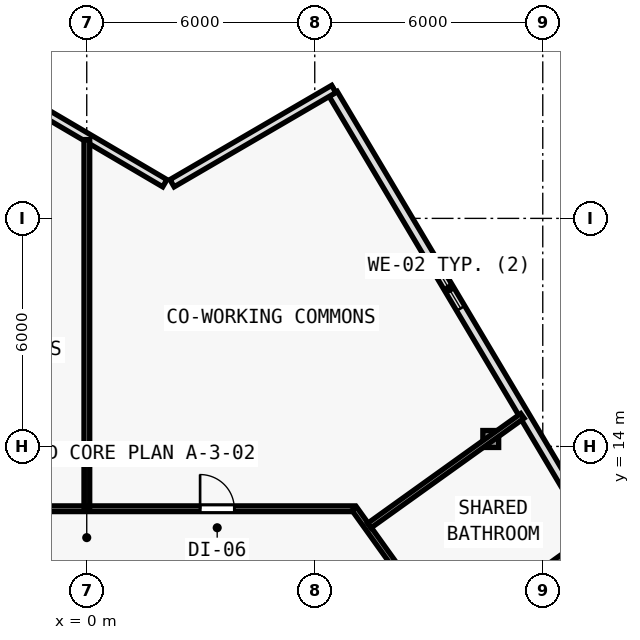
"""IFC4 building model, lengths in metres.
Left out: names, types, materials, properties, quantities, classifications, styles, units other than length and angle.
Written with IfcOpenShell. Run it as: python <this file> out.ifc"""

import sys

from ifc_helpers import new_model, si_unit, direction, frame, frame_2d, origin, origin_2d, place, context, subcontext, project, spatial, rectangle, i_section, extrude, element, fill, save


model = new_model("IFC4")
c1 = context("Model", 3, precision=1e-05, world=origin(), true_north=direction((0.0, 1.0)))
c2 = subcontext(c1, "Body", "Model", "MODEL_VIEW")
j1 = project(units=[si_unit("LENGTHUNIT", "METRE"), si_unit("PLANEANGLEUNIT", "RADIAN")], contexts=[c1])
p1 = place(None, origin())
s1 = spatial("IfcSite", under=j1, at=p1, CompositionType="ELEMENT")
p2 = place(p1, origin())
s2 = spatial("IfcBuilding", under=s1, at=p2, CompositionType="ELEMENT")
p3 = place(p2, frame((0.0, 0.0, 48.0)))
s3 = spatial("IfcBuildingStorey", under=s2, at=p3, CompositionType="ELEMENT", Elevation=48.0)
p4 = place(p3, frame((10.632, 14.195, 0.006), z_axis=(-0.011767855299, -0.002516824544, 0.999927588966), x_axis=(0.209143047003, -0.977885057607, 0.0)))
e1 = element("IfcColumn", 1, at=p4, inside=s3, PredefinedType="COLUMN", context=c2, shape_type="SweptSolid", body=[
    extrude(i_section(OverallWidth=0.416, OverallDepth=0.446, WebThickness=0.025, FlangeThickness=0.04, FilletRadius=0.015, at=origin_2d()), origin(), (0.0, 0.0, 1.0), 3.589),
])
p5 = place(p3, frame((6.483, 23.278, 0.0), z_axis=(0.0, 0.0, 1.0), x_axis=(0.511086421046, -0.859529330635, 0.0)))
e2 = element("IfcWall", 2, at=p5, inside=s3, PredefinedType="SOLIDWALL", context=c2, shape_type="SweptSolid", body=[
    extrude(rectangle(XDim=11.935, YDim=0.25, at=frame_2d((5.968, 0.0))), origin(), (0.0, 0.0, 1.0), 3.35),
])
p6 = place(p5, frame((5.368, 0.0, 0.62)))
e3 = element("IfcOpeningElement", 3, at=p6, cuts=e2, PredefinedType="OPENING", context=c2, shape_type="SweptSolid", body=[
    extrude(rectangle(XDim=1.2, YDim=1.8, at=frame_2d((0.6, 0.9))), frame((0.0, 0.135, 0.0), z_axis=(0.0, -1.0, 0.0), x_axis=(1.0, 0.0, 0.0)), (0.0, 0.0, 1.0), 0.27),
])
p7 = place(p3, frame((2.245, 20.925, 0.0), z_axis=(0.0, 0.0, 1.0), x_axis=(0.863967641515, 0.503547330858, 0.0)))
e4 = element("IfcWall", 4, at=p7, inside=s3, PredefinedType="SOLIDWALL", context=c2, shape_type="SweptSolid", body=[
    extrude(rectangle(XDim=4.925, YDim=0.22, at=frame_2d((2.462, 0.0))), origin(), (0.0, 0.0, 1.0), 3.35),
])
p8 = place(p3, frame((-2.635, 23.681, 0.0), z_axis=(0.0, 0.0, 1.0), x_axis=(0.862126841454, -0.506692519428, 0.0)))
e5 = element("IfcWall", 5, at=p8, inside=s3, PredefinedType="SOLIDWALL", context=c2, shape_type="SweptSolid", body=[
    extrude(rectangle(XDim=5.439, YDim=0.22, at=frame_2d((2.72, 0.0))), origin(), (0.0, 0.0, 1.0), 3.35),
])
p9 = place(p3, frame((-7.041, 12.36, 0.0), z_axis=(0.0, 0.0, 1.0), x_axis=(1.0, 0.0, 0.0)))
e6 = element("IfcWall", 6, at=p9, inside=s3, PredefinedType="PARTITIONING", context=c2, shape_type="SweptSolid", body=[
    extrude(rectangle(XDim=14.082, YDim=0.15, at=frame_2d((7.041, 0.0))), origin(), (0.0, 0.0, 1.0), 3.35),
])
p10 = place(p9, frame((10.024, 0.0, 0.0)))
e7 = element("IfcOpeningElement", 7, at=p10, cuts=e6, PredefinedType="OPENING", context=c2, shape_type="SweptSolid", body=[
    extrude(rectangle(XDim=0.9, YDim=2.1, at=frame_2d((0.45, 1.05))), frame((0.0, 0.085, 0.0), z_axis=(0.0, -1.0, 0.0), x_axis=(1.0, 0.0, 0.0)), (0.0, 0.0, 1.0), 0.17),
])
p11 = place(p9, frame((3.161, 0.0, 0.0)))
e8 = element("IfcOpeningElement", 8, at=p11, cuts=e6, PredefinedType="OPENING", context=c2, shape_type="SweptSolid", body=[
    extrude(rectangle(XDim=0.9, YDim=2.1, at=frame_2d((0.45, 1.05))), frame((0.0, 0.085, 0.0), z_axis=(0.0, -1.0, 0.0), x_axis=(1.0, 0.0, 0.0)), (0.0, 0.0, 1.0), 0.17),
])
p12 = place(p3, frame((7.041, 12.36, 0.0), z_axis=(0.0, 0.0, 1.0), x_axis=(0.582449511476, -0.812866881218, 0.0)))
e9 = element("IfcWall", 9, at=p12, inside=s3, PredefinedType="PARTITIONING", context=c2, shape_type="SweptSolid", body=[
    extrude(rectangle(XDim=4.84, YDim=0.15, at=frame_2d((2.42, 0.0))), origin(), (0.0, 0.0, 1.0), 2.725),
])
p13 = place(p12, frame((2.86, 0.0, 0.0)))
e10 = element("IfcOpeningElement", 10, at=p13, cuts=e9, PredefinedType="OPENING", context=c2, shape_type="SweptSolid", body=[
    extrude(rectangle(XDim=0.85, YDim=2.1, at=frame_2d((0.425, 1.05))), frame((0.0, 0.085, 0.0), z_axis=(0.0, -1.0, 0.0), x_axis=(1.0, 0.0, 0.0)), (0.0, 0.0, 1.0), 0.17),
])
p14 = place(p3, frame((7.434, 11.915, 0.0), z_axis=(0.0, 0.0, 1.0), x_axis=(0.812890943838, 0.582415928205, 0.0)))
e11 = element("IfcWall", 11, at=p14, inside=s3, PredefinedType="PARTITIONING", context=c2, shape_type="SweptSolid", body=[
    extrude(rectangle(XDim=4.958, YDim=0.15, at=frame_2d((2.479, 0.0))), origin(), (0.0, 0.0, 1.0), 2.725),
])
p15 = place(p3, frame((9.553, 8.957, 0.0), z_axis=(0.0, 0.0, 1.0), x_axis=(0.812884279405, 0.58242522979, 0.0)))
e12 = element("IfcWall", 12, at=p15, inside=s3, PredefinedType="PARTITIONING", context=c2, shape_type="SweptSolid", body=[
    extrude(rectangle(XDim=4.647, YDim=0.15, at=frame_2d((2.324, 0.0))), origin(), (0.0, 0.0, 1.0), 2.735),
])
p16 = place(p3, frame((0.003, 12.42, 0.0), z_axis=(0.0, 0.0, 1.0), x_axis=(0.0, 1.0, 0.0)))
e13 = element("IfcWall", 13, at=p16, inside=s3, PredefinedType="PARTITIONING", context=c2, shape_type="SweptSolid", body=[
    extrude(rectangle(XDim=9.653, YDim=0.15, at=frame_2d((4.827, 0.0))), origin(), (0.0, 0.0, 1.0), 2.735),
])
p17 = place(p6, origin())
e14 = element("IfcWindow", 14, at=p17, inside=s3, PartitioningType="SINGLE_PANEL", PredefinedType="WINDOW", context=c2, shape_type="SweptSolid", body=[
    extrude(rectangle(XDim=1.2, YDim=1.8, at=frame_2d((0.6, 0.9))), frame((0.0, 0.03, 0.0), z_axis=(0.0, -1.0, 0.0), x_axis=(1.0, 0.0, 0.0)), (0.0, 0.0, 1.0), 0.06),
])
fill(e3, e14)
p18 = place(p10, origin())
e15 = element("IfcDoor", 15, at=p18, inside=s3, OperationType="SINGLE_SWING_LEFT", PredefinedType="DOOR", context=c2, shape_type="SweptSolid", body=[
    extrude(rectangle(XDim=0.9, YDim=2.1, at=frame_2d((0.45, 1.05))), frame((0.0, 0.025, 0.0), z_axis=(0.0, -1.0, 0.0), x_axis=(1.0, 0.0, 0.0)), (0.0, 0.0, 1.0), 0.05),
])
fill(e7, e15)
save(model, sys.argv[1])
